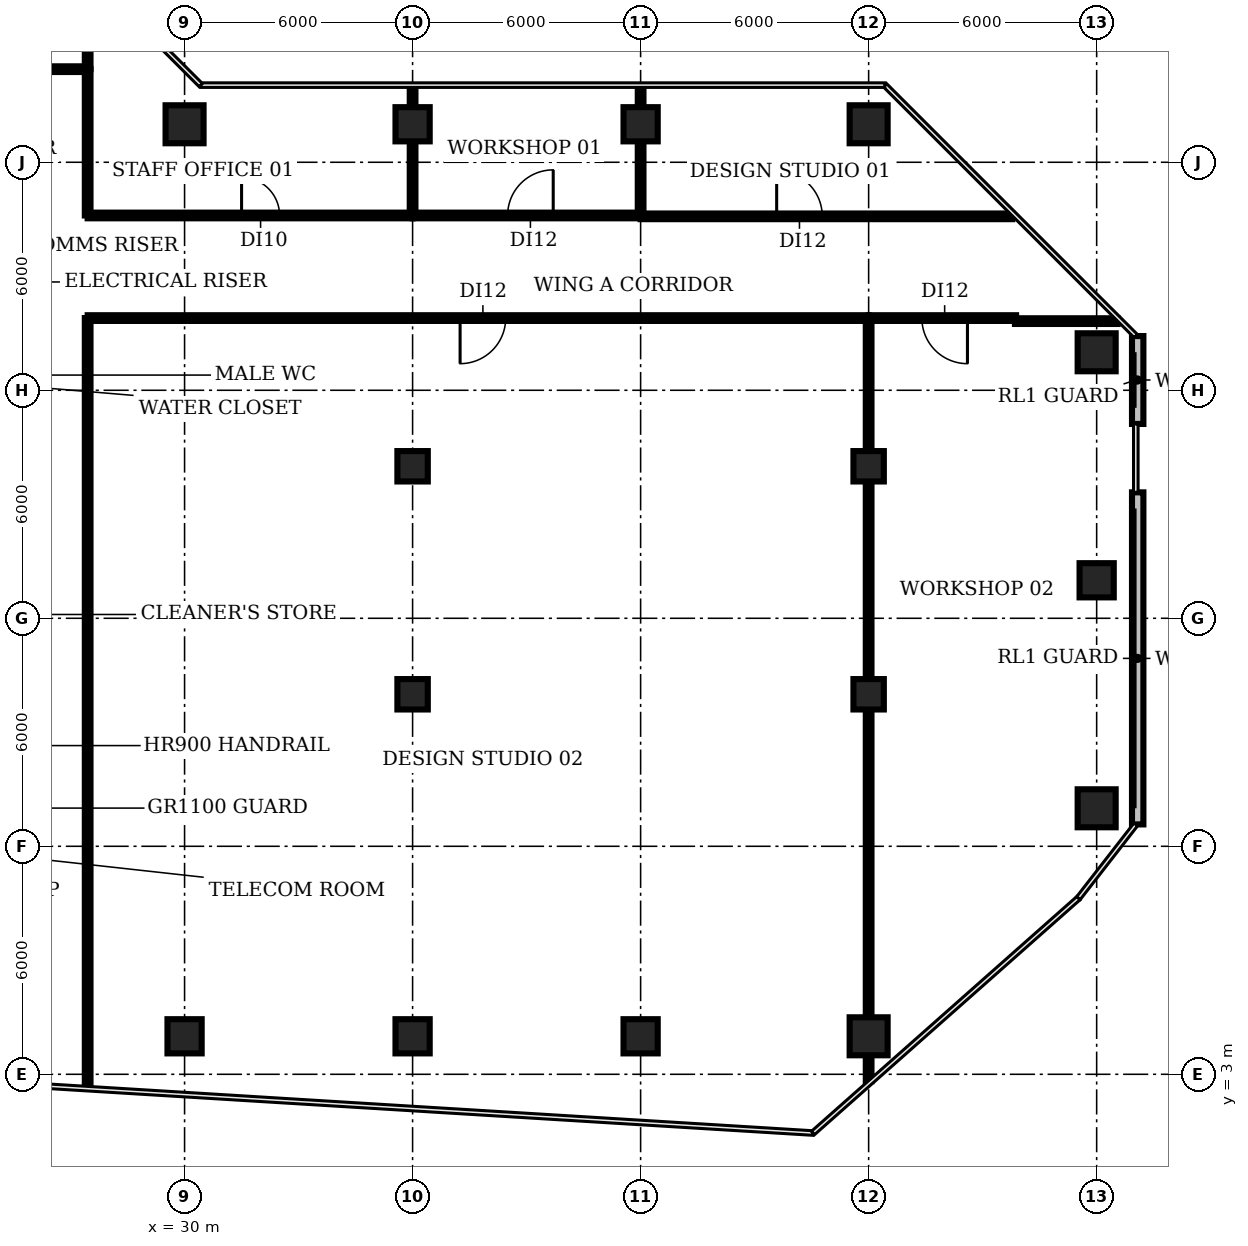
"""IFC4 building model, lengths in metres.
Left out: names, types, materials, properties, quantities, classifications, styles, units other than length and angle.
Written with IfcOpenShell. Run it as: python <this file> out.ifc"""

import sys

from ifc_helpers import new_model, si_unit, direction, frame, frame_2d, origin, origin_2d, place, context, subcontext, project, spatial, rectangle, circle, extrude, element, fill, save


model = new_model("IFC4")
c1 = context("Model", 3, precision=1e-05, world=origin(), true_north=direction((0.0, 1.0)))
c2 = subcontext(c1, "Body", "Model", "MODEL_VIEW")
j1 = project(units=[si_unit("LENGTHUNIT", "METRE"), si_unit("PLANEANGLEUNIT", "RADIAN")], contexts=[c1])
p1 = place(None, origin())
s1 = spatial("IfcSite", under=j1, at=p1, CompositionType="ELEMENT")
p2 = place(p1, origin())
s2 = spatial("IfcBuilding", under=s1, at=p2, CompositionType="ELEMENT")
p3 = place(p2, frame((0.0, 0.0, 125.6)))
s3 = spatial("IfcBuildingStorey", under=s2, at=p3, CompositionType="ELEMENT", Elevation=125.6)
p4 = place(p3, frame((30.0, 4.0, 0.0), z_axis=(0.0, 0.0, 1.0), x_axis=(1.0, 0.0, 0.0)))
e1 = element("IfcColumn", 1, at=p4, inside=s3, PredefinedType="COLUMN", context=c2, shape_type="SweptSolid", body=[
    extrude(rectangle(XDim=0.9, YDim=0.9, at=origin_2d()), origin(), (0.0, 0.0, 1.0), 3.85),
])
p5 = place(p3, frame((30.0, 28.0, 0.0), z_axis=(0.0, 0.0, 1.0), x_axis=(1.0, 0.0, 0.0)))
e2 = element("IfcColumn", 2, at=p5, inside=s3, PredefinedType="COLUMN", context=c2, shape_type="SweptSolid", body=[
    extrude(circle(Radius=0.5, at=origin_2d()), origin(), (0.0, 0.0, 1.0), 3.85),
])
p6 = place(p3, frame((36.0, 4.0, 0.0), z_axis=(0.0, 0.0, 1.0), x_axis=(1.0, 0.0, 0.0)))
e3 = element("IfcColumn", 3, at=p6, inside=s3, PredefinedType="COLUMN", context=c2, shape_type="SweptSolid", body=[
    extrude(rectangle(XDim=0.9, YDim=0.9, at=origin_2d()), origin(), (0.0, 0.0, 1.0), 3.85),
])
for number, where, z_axis, x_axis in (
    (4, (36.0, 13.0, 0.0), (0.0, 0.0, 1.0), (1.0, 0.0, 0.0)),
    (5, (36.0, 19.0, 0.0), (0.0, 0.0, 1.0), (1.0, 0.0, 0.0)),
):
    element("IfcColumn", number, at=place(p3, frame(where, z_axis=z_axis, x_axis=x_axis)), inside=s3, PredefinedType="COLUMN", context=c2, shape_type="SweptSolid", body=[
        extrude(rectangle(XDim=0.8, YDim=0.8, at=origin_2d()), origin(), (0.0, 0.0, 1.0), 3.85),
    ])
for number, where, z_axis, x_axis in (
    (6, (36.0, 28.0, 0.0), (0.0, 0.0, 1.0), (1.0, 0.0, 0.0)),
    (7, (42.0, 4.0, 0.0), (0.0, 0.0, 1.0), (1.0, 0.0, 0.0)),
    (8, (42.0, 28.0, 0.0), (0.0, 0.0, 1.0), (1.0, 0.0, 0.0)),
):
    element("IfcColumn", number, at=place(p3, frame(where, z_axis=z_axis, x_axis=x_axis)), inside=s3, PredefinedType="COLUMN", context=c2, shape_type="SweptSolid", body=[
        extrude(rectangle(XDim=0.9, YDim=0.9, at=origin_2d()), origin(), (0.0, 0.0, 1.0), 3.85),
    ])
p7 = place(p3, frame((48.0, 4.0, 0.0), z_axis=(0.0, 0.0, 1.0), x_axis=(1.0, 0.0, 0.0)))
e9 = element("IfcColumn", 9, at=p7, inside=s3, PredefinedType="COLUMN", context=c2, shape_type="SweptSolid", body=[
    extrude(circle(Radius=0.5, at=origin_2d()), origin(), (0.0, 0.0, 1.0), 3.85),
])
for number, where, z_axis, x_axis in (
    (10, (48.0, 13.0, 0.0), (0.0, 0.0, 1.0), (1.0, 0.0, 0.0)),
    (11, (48.0, 19.0, 0.0), (0.0, 0.0, 1.0), (1.0, 0.0, 0.0)),
):
    element("IfcColumn", number, at=place(p3, frame(where, z_axis=z_axis, x_axis=x_axis)), inside=s3, PredefinedType="COLUMN", context=c2, shape_type="SweptSolid", body=[
        extrude(rectangle(XDim=0.8, YDim=0.8, at=origin_2d()), origin(), (0.0, 0.0, 1.0), 3.85),
    ])
for number, where, z_axis, x_axis in (
    (12, (48.0, 28.0, 0.0), (0.0, 0.0, 1.0), (1.0, 0.0, 0.0)),
    (13, (54.0, 10.0, 0.0), (0.0, 0.0, 1.0), (1.0, 0.0, 0.0)),
):
    element("IfcColumn", number, at=place(p3, frame(where, z_axis=z_axis, x_axis=x_axis)), inside=s3, PredefinedType="COLUMN", context=c2, shape_type="SweptSolid", body=[
        extrude(circle(Radius=0.5, at=origin_2d()), origin(), (0.0, 0.0, 1.0), 3.85),
    ])
p8 = place(p3, frame((54.0, 16.0, 0.0), z_axis=(0.0, 0.0, 1.0), x_axis=(1.0, 0.0, 0.0)))
e14 = element("IfcColumn", 14, at=p8, inside=s3, PredefinedType="COLUMN", context=c2, shape_type="SweptSolid", body=[
    extrude(rectangle(XDim=0.9, YDim=0.9, at=origin_2d()), origin(), (0.0, 0.0, 1.0), 3.85),
])
p9 = place(p3, frame((54.0, 22.0, 0.0), z_axis=(0.0, 0.0, 1.0), x_axis=(1.0, 0.0, 0.0)))
e15 = element("IfcColumn", 15, at=p9, inside=s3, PredefinedType="COLUMN", context=c2, shape_type="SweptSolid", body=[
    extrude(circle(Radius=0.5, at=origin_2d()), origin(), (0.0, 0.0, 1.0), 3.85),
])
p10 = place(p3, frame((55.08, 9.575, 0.0), z_axis=(0.0, 0.0, 1.0), x_axis=(0.0, 1.0, 0.0)))
e16 = element("IfcWall", 16, at=p10, inside=s3, PredefinedType="SOLIDWALL", context=c2, shape_type="SweptSolid", body=[
    extrude(rectangle(XDim=8.739, YDim=0.3, at=frame_2d((4.369, 0.0))), origin(), (0.0, 0.0, 1.0), 3.85),
])
p11 = place(p3, frame((55.08, 20.114, 0.0), z_axis=(0.0, 0.0, 1.0), x_axis=(0.0, 1.0, 0.0)))
e17 = element("IfcWall", 17, at=p11, inside=s3, PredefinedType="SOLIDWALL", context=c2, shape_type="SweptSolid", body=[
    extrude(rectangle(XDim=2.312, YDim=0.3, at=frame_2d((1.156, 0.0))), origin(), (0.0, 0.0, 1.0), 3.85),
])
p12 = place(p3, frame((23.85, 29.45, 0.0), z_axis=(0.0, 0.0, 1.0), x_axis=(1.0, 0.0, 0.0)))
e18 = element("IfcWall", 18, at=p12, inside=s3, PredefinedType="PARTITIONING", context=c2, shape_type="SweptSolid", body=[
    extrude(rectangle(XDim=3.6, YDim=0.15, at=frame_2d((1.8, 0.0))), origin(), (0.0, 0.0, 1.0), 2.83),
])
p13 = place(p12, frame((1.3, 0.0, 0.0)))
e19 = element("IfcOpeningElement", 19, at=p13, cuts=e18, PredefinedType="OPENING", context=c2, shape_type="SweptSolid", body=[
    extrude(rectangle(XDim=0.9, YDim=2.1, at=frame_2d((0.45, 1.05))), frame((0.0, 0.085, 0.0), z_axis=(0.0, -1.0, 0.0), x_axis=(1.0, 0.0, 0.0)), (0.0, 0.0, 1.0), 0.17),
])
p14 = place(p3, frame((27.45, 2.67, 0.0), z_axis=(0.0, 0.0, 1.0), x_axis=(0.0, 1.0, 0.0)))
e20 = element("IfcWall", 20, at=p14, inside=s3, PredefinedType="PARTITIONING", context=c2, shape_type="SweptSolid", body=[
    extrude(rectangle(XDim=20.23, YDim=0.15, at=frame_2d((10.115, 0.0))), origin(), (0.0, 0.0, 1.0), 2.83),
])
p15 = place(p3, frame((27.45, 25.6, 0.0), z_axis=(0.0, 0.0, 1.0), x_axis=(0.0, 1.0, 0.0)))
e21 = element("IfcWall", 21, at=p15, inside=s3, PredefinedType="PARTITIONING", context=c2, shape_type="SweptSolid", body=[
    extrude(rectangle(XDim=3.85, YDim=0.15, at=frame_2d((1.925, 0.0))), origin(), (0.0, 0.0, 1.0), 2.83),
])
p16 = place(p3, frame((27.45, 25.6, 0.0), z_axis=(0.0, 0.0, 1.0), x_axis=(1.0, 0.0, 0.0)))
e22 = element("IfcWall", 22, at=p16, inside=s3, PredefinedType="PARTITIONING", context=c2, shape_type="SweptSolid", body=[
    extrude(rectangle(XDim=8.55, YDim=0.15, at=frame_2d((4.275, 0.0))), origin(), (0.0, 0.0, 1.0), 2.83),
])
p17 = place(p16, frame((4.05, 0.0, 0.0)))
e23 = element("IfcOpeningElement", 23, at=p17, cuts=e22, PredefinedType="OPENING", context=c2, shape_type="SweptSolid", body=[
    extrude(rectangle(XDim=1.0, YDim=2.1, at=frame_2d((0.5, 1.05))), frame((0.0, 0.085, 0.0), z_axis=(0.0, -1.0, 0.0), x_axis=(1.0, 0.0, 0.0)), (0.0, 0.0, 1.0), 0.17),
])
p18 = place(p3, frame((27.45, 29.45, 0.0), z_axis=(0.0, 0.0, 1.0), x_axis=(0.0, 1.0, 0.0)))
e24 = element("IfcWall", 24, at=p18, inside=s3, PredefinedType="PARTITIONING", context=c2, shape_type="SweptSolid", body=[
    extrude(rectangle(XDim=2.49, YDim=0.15, at=frame_2d((1.245, 0.0))), origin(), (0.0, 0.0, 1.0), 2.83),
])
p19 = place(p3, frame((36.0, 25.6, 0.0), z_axis=(0.0, 0.0, 1.0), x_axis=(0.0, 1.0, 0.0)))
e25 = element("IfcWall", 25, at=p19, inside=s3, PredefinedType="PARTITIONING", context=c2, shape_type="SweptSolid", body=[
    extrude(rectangle(XDim=3.38, YDim=0.15, at=frame_2d((1.69, 0.0))), origin(), (0.0, 0.0, 1.0), 2.83),
])
p20 = place(p3, frame((36.0, 25.6, 0.0), z_axis=(0.0, 0.0, 1.0), x_axis=(1.0, 0.0, 0.0)))
e26 = element("IfcWall", 26, at=p20, inside=s3, PredefinedType="PARTITIONING", context=c2, shape_type="SweptSolid", body=[
    extrude(rectangle(XDim=6.0, YDim=0.15, at=frame_2d((3.0, 0.0))), origin(), (0.0, 0.0, 1.0), 2.83),
])
p21 = place(p20, frame((2.5, 0.0, 0.0)))
e27 = element("IfcOpeningElement", 27, at=p21, cuts=e26, PredefinedType="OPENING", context=c2, shape_type="SweptSolid", body=[
    extrude(rectangle(XDim=1.2, YDim=2.1, at=frame_2d((0.6, 1.05))), frame((0.0, 0.085, 0.0), z_axis=(0.0, -1.0, 0.0), x_axis=(1.0, 0.0, 0.0)), (0.0, 0.0, 1.0), 0.17),
])
p22 = place(p3, frame((42.0, 25.577, 0.0), z_axis=(0.0, 0.0, 1.0), x_axis=(1.0, 0.0, 0.0)))
e28 = element("IfcWall", 28, at=p22, inside=s3, PredefinedType="PARTITIONING", context=c2, shape_type="SweptSolid", body=[
    extrude(rectangle(XDim=9.78, YDim=0.15, at=frame_2d((4.89, 0.0))), origin(), (0.0, 0.0, 1.0), 2.83),
])
p23 = place(p22, frame((3.58, 0.0, 0.0)))
e29 = element("IfcOpeningElement", 29, at=p23, cuts=e28, PredefinedType="OPENING", context=c2, shape_type="SweptSolid", body=[
    extrude(rectangle(XDim=1.2, YDim=2.1, at=frame_2d((0.6, 1.05))), frame((0.0, 0.085, 0.0), z_axis=(0.0, -1.0, 0.0), x_axis=(1.0, 0.0, 0.0)), (0.0, 0.0, 1.0), 0.17),
])
p24 = place(p3, frame((42.0, 25.6, 0.0), z_axis=(0.0, 0.0, 1.0), x_axis=(0.0, 1.0, 0.0)))
e30 = element("IfcWall", 30, at=p24, inside=s3, PredefinedType="PARTITIONING", context=c2, shape_type="SweptSolid", body=[
    extrude(rectangle(XDim=3.38, YDim=0.15, at=frame_2d((1.69, 0.0))), origin(), (0.0, 0.0, 1.0), 2.83),
])
p25 = place(p3, frame((48.0, 2.82, 0.0), z_axis=(0.0, 0.0, 1.0), x_axis=(0.0, 1.0, 0.0)))
e31 = element("IfcWall", 31, at=p25, inside=s3, PredefinedType="PARTITIONING", context=c2, shape_type="SweptSolid", body=[
    extrude(rectangle(XDim=20.08, YDim=0.15, at=frame_2d((10.04, 0.0))), origin(), (0.0, 0.0, 1.0), 2.83),
])
p26 = place(p3, frame((48.0, 22.9, 0.0), z_axis=(0.0, 0.0, 1.0), x_axis=(-1.0, 0.0, 0.0)))
e32 = element("IfcWall", 32, at=p26, inside=s3, PredefinedType="PARTITIONING", context=c2, shape_type="SweptSolid", body=[
    extrude(rectangle(XDim=20.55, YDim=0.15, at=frame_2d((10.275, 0.0))), origin(), (0.0, 0.0, 1.0), 2.83),
])
p27 = place(p26, frame((9.55, 0.0, 0.0)))
e33 = element("IfcOpeningElement", 33, at=p27, cuts=e32, PredefinedType="OPENING", context=c2, shape_type="SweptSolid", body=[
    extrude(rectangle(XDim=1.2, YDim=2.1, at=frame_2d((0.6, 1.05))), frame((0.0, 0.085, 0.0), z_axis=(0.0, -1.0, 0.0), x_axis=(1.0, 0.0, 0.0)), (0.0, 0.0, 1.0), 0.17),
])
p28 = place(p3, frame((51.85, 22.82, 0.0), z_axis=(0.0, 0.0, 1.0), x_axis=(1.0, 0.0, 0.0)))
e34 = element("IfcWall", 34, at=p28, inside=s3, PredefinedType="PARTITIONING", context=c2, shape_type="SweptSolid", body=[
    extrude(rectangle(XDim=2.702, YDim=0.15, at=frame_2d((1.351, 0.0))), origin(), (0.0, 0.0, 1.0), 2.83),
])
p29 = place(p3, frame((51.88, 22.9, 0.0), z_axis=(0.0, 0.0, 1.0), x_axis=(-1.0, 0.0, 0.0)))
e35 = element("IfcWall", 35, at=p29, inside=s3, PredefinedType="PARTITIONING", context=c2, shape_type="SweptSolid", body=[
    extrude(rectangle(XDim=3.88, YDim=0.15, at=frame_2d((1.94, 0.0))), origin(), (0.0, 0.0, 1.0), 2.83),
])
p30 = place(p29, frame((1.28, 0.0, 0.0)))
e36 = element("IfcOpeningElement", 36, at=p30, cuts=e35, PredefinedType="OPENING", context=c2, shape_type="SweptSolid", body=[
    extrude(rectangle(XDim=1.2, YDim=2.1, at=frame_2d((0.6, 1.05))), frame((0.0, 0.085, 0.0), z_axis=(0.0, -1.0, 0.0), x_axis=(1.0, 0.0, 0.0)), (0.0, 0.0, 1.0), 0.17),
])
p31 = place(p17, origin())
e37 = element("IfcDoor", 37, at=p31, inside=s3, OperationType="SINGLE_SWING_LEFT", PredefinedType="DOOR", context=c2, shape_type="SweptSolid", body=[
    extrude(rectangle(XDim=1.0, YDim=2.1, at=frame_2d((0.5, 1.05))), frame((0.0, 0.025, 0.0), z_axis=(0.0, -1.0, 0.0), x_axis=(1.0, 0.0, 0.0)), (0.0, 0.0, 1.0), 0.05),
])
fill(e23, e37)
p32 = place(p21, origin())
e38 = element("IfcDoor", 38, at=p32, inside=s3, OperationType="SINGLE_SWING_RIGHT", PredefinedType="DOOR", context=c2, shape_type="SweptSolid", body=[
    extrude(rectangle(XDim=1.2, YDim=2.1, at=frame_2d((0.6, 1.05))), frame((0.0, 0.025, 0.0), z_axis=(0.0, -1.0, 0.0), x_axis=(1.0, 0.0, 0.0)), (0.0, 0.0, 1.0), 0.05),
])
fill(e27, e38)
p33 = place(p23, origin())
e39 = element("IfcDoor", 39, at=p33, inside=s3, OperationType="SINGLE_SWING_LEFT", PredefinedType="DOOR", context=c2, shape_type="SweptSolid", body=[
    extrude(rectangle(XDim=1.2, YDim=2.1, at=frame_2d((0.6, 1.05))), frame((0.0, 0.025, 0.0), z_axis=(0.0, -1.0, 0.0), x_axis=(1.0, 0.0, 0.0)), (0.0, 0.0, 1.0), 0.05),
])
fill(e29, e39)
p34 = place(p27, origin())
e40 = element("IfcDoor", 40, at=p34, inside=s3, OperationType="SINGLE_SWING_RIGHT", PredefinedType="DOOR", context=c2, shape_type="SweptSolid", body=[
    extrude(rectangle(XDim=1.2, YDim=2.1, at=frame_2d((0.6, 1.05))), frame((0.0, 0.025, 0.0), z_axis=(0.0, -1.0, 0.0), x_axis=(1.0, 0.0, 0.0)), (0.0, 0.0, 1.0), 0.05),
])
fill(e33, e40)
p35 = place(p30, origin())
e41 = element("IfcDoor", 41, at=p35, inside=s3, OperationType="SINGLE_SWING_LEFT", PredefinedType="DOOR", context=c2, shape_type="SweptSolid", body=[
    extrude(rectangle(XDim=1.2, YDim=2.1, at=frame_2d((0.6, 1.05))), frame((0.0, 0.025, 0.0), z_axis=(0.0, -1.0, 0.0), x_axis=(1.0, 0.0, 0.0)), (0.0, 0.0, 1.0), 0.05),
])
fill(e36, e41)
save(model, sys.argv[1])
